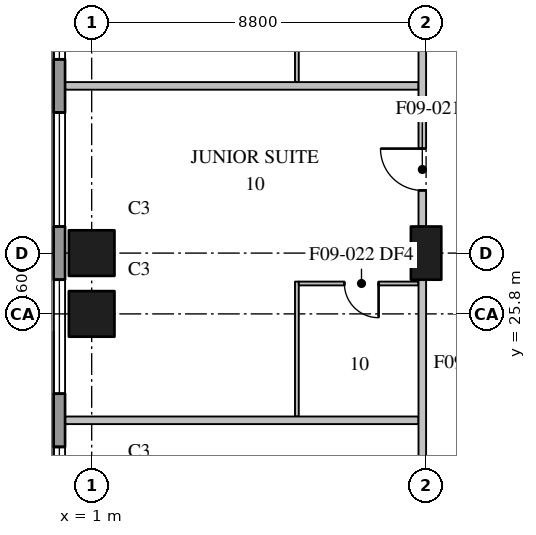
"""IFC4 building model, lengths in metres.
Left out: names, types, materials, properties, quantities, classifications, styles, units other than length and angle.
Written with IfcOpenShell. Run it as: python <this file> out.ifc"""

import sys

from ifc_helpers import new_model, si_unit, direction, frame, frame_2d, origin, origin_2d, place, context, subcontext, project, spatial, rectangle, extrude, element, fill, save


model = new_model("IFC4")
c1 = context("Model", 3, precision=1e-05, world=origin(), true_north=direction((0.0, 1.0)))
c2 = subcontext(c1, "Body", "Model", "MODEL_VIEW")
j1 = project(units=[si_unit("LENGTHUNIT", "METRE"), si_unit("PLANEANGLEUNIT", "RADIAN")], contexts=[c1])
p1 = place(None, origin())
s1 = spatial("IfcSite", under=j1, at=p1, CompositionType="ELEMENT")
p2 = place(p1, origin())
s2 = spatial("IfcBuilding", under=s1, at=p2, CompositionType="ELEMENT")
p3 = place(p2, frame((0.0, 0.0, 98.2)))
s3 = spatial("IfcBuildingStorey", under=s2, at=p3, CompositionType="ELEMENT", Elevation=98.2)
for number, where, z_axis, x_axis in (
    (1, (1.0, 25.8, 0.0), (0.0, 0.0, 1.0), (1.0, 0.0, 0.0)),
    (2, (1.0, 27.4, 0.0), (0.0, 0.0, 1.0), (1.0, 0.0, 0.0)),
):
    element("IfcColumn", number, at=place(p3, frame(where, z_axis=z_axis, x_axis=x_axis)), inside=s3, PredefinedType="COLUMN", context=c2, shape_type="SweptSolid", body=[
        extrude(rectangle(XDim=1.2, YDim=1.2, at=origin_2d()), origin(), (0.0, 0.0, 1.0), 3.7),
    ])
p4 = place(p3, frame((9.8, 27.4, 0.0), z_axis=(0.0, 0.0, 1.0), x_axis=(0.0, 1.0, 0.0)))
e3 = element("IfcColumn", 3, at=p4, inside=s3, PredefinedType="COLUMN", context=c2, shape_type="SweptSolid", body=[
    extrude(rectangle(XDim=1.4, YDim=0.8, at=origin_2d()), origin(), (0.0, 0.0, 1.0), 3.7),
])
p5 = place(p3, frame((0.15, 78.7, 0.0), z_axis=(0.0, 0.0, 1.0), x_axis=(0.0, -1.0, 0.0)))
e4 = element("IfcWall", 4, at=p5, inside=s3, PredefinedType="STANDARD", context=c2, shape_type="SweptSolid", body=[
    extrude(rectangle(XDim=76.5, YDim=0.3, at=frame_2d((38.25, 0.0))), origin(), (0.0, 0.0, 1.0), 3.3),
])
p6 = place(p5, frame((3.6, 0.0, 0.75)))
e5 = element("IfcOpeningElement", 5, at=p6, cuts=e4, PredefinedType="OPENING", context=c2, shape_type="SweptSolid", body=[
    extrude(rectangle(XDim=3.0, YDim=2.3, at=frame_2d((1.5, 1.15))), frame((0.0, 0.16, 0.0), z_axis=(0.0, -1.0, 0.0), x_axis=(1.0, 0.0, 0.0)), (0.0, 0.0, 1.0), 0.32),
])
p7 = place(p5, frame((8.0, 0.0, 0.75)))
e6 = element("IfcOpeningElement", 6, at=p7, cuts=e4, PredefinedType="OPENING", context=c2, shape_type="SweptSolid", body=[
    extrude(rectangle(XDim=3.0, YDim=2.3, at=frame_2d((1.5, 1.15))), frame((0.0, 0.16, 0.0), z_axis=(0.0, -1.0, 0.0), x_axis=(1.0, 0.0, 0.0)), (0.0, 0.0, 1.0), 0.32),
])
p8 = place(p5, frame((12.4, 0.0, 0.75)))
e7 = element("IfcOpeningElement", 7, at=p8, cuts=e4, PredefinedType="OPENING", context=c2, shape_type="SweptSolid", body=[
    extrude(rectangle(XDim=3.0, YDim=2.3, at=frame_2d((1.5, 1.15))), frame((0.0, 0.16, 0.0), z_axis=(0.0, -1.0, 0.0), x_axis=(1.0, 0.0, 0.0)), (0.0, 0.0, 1.0), 0.32),
])
p9 = place(p5, frame((16.8, 0.0, 0.75)))
e8 = element("IfcOpeningElement", 8, at=p9, cuts=e4, PredefinedType="OPENING", context=c2, shape_type="SweptSolid", body=[
    extrude(rectangle(XDim=3.0, YDim=2.3, at=frame_2d((1.5, 1.15))), frame((0.0, 0.16, 0.0), z_axis=(0.0, -1.0, 0.0), x_axis=(1.0, 0.0, 0.0)), (0.0, 0.0, 1.0), 0.32),
])
p10 = place(p5, frame((21.2, 0.0, 0.75)))
e9 = element("IfcOpeningElement", 9, at=p10, cuts=e4, PredefinedType="OPENING", context=c2, shape_type="SweptSolid", body=[
    extrude(rectangle(XDim=3.0, YDim=2.3, at=frame_2d((1.5, 1.15))), frame((0.0, 0.16, 0.0), z_axis=(0.0, -1.0, 0.0), x_axis=(1.0, 0.0, 0.0)), (0.0, 0.0, 1.0), 0.32),
])
p11 = place(p5, frame((25.6, 0.0, 0.75)))
e10 = element("IfcOpeningElement", 10, at=p11, cuts=e4, PredefinedType="OPENING", context=c2, shape_type="SweptSolid", body=[
    extrude(rectangle(XDim=3.0, YDim=2.3, at=frame_2d((1.5, 1.15))), frame((0.0, 0.16, 0.0), z_axis=(0.0, -1.0, 0.0), x_axis=(1.0, 0.0, 0.0)), (0.0, 0.0, 1.0), 0.32),
])
p12 = place(p5, frame((30.0, 0.0, 0.75)))
e11 = element("IfcOpeningElement", 11, at=p12, cuts=e4, PredefinedType="OPENING", context=c2, shape_type="SweptSolid", body=[
    extrude(rectangle(XDim=3.0, YDim=2.3, at=frame_2d((1.5, 1.15))), frame((0.0, 0.16, 0.0), z_axis=(0.0, -1.0, 0.0), x_axis=(1.0, 0.0, 0.0)), (0.0, 0.0, 1.0), 0.32),
])
p13 = place(p5, frame((34.4, 0.0, 0.75)))
e12 = element("IfcOpeningElement", 12, at=p13, cuts=e4, PredefinedType="OPENING", context=c2, shape_type="SweptSolid", body=[
    extrude(rectangle(XDim=3.0, YDim=2.3, at=frame_2d((1.5, 1.15))), frame((0.0, 0.16, 0.0), z_axis=(0.0, -1.0, 0.0), x_axis=(1.0, 0.0, 0.0)), (0.0, 0.0, 1.0), 0.32),
])
p14 = place(p5, frame((38.8, 0.0, 0.75)))
e13 = element("IfcOpeningElement", 13, at=p14, cuts=e4, PredefinedType="OPENING", context=c2, shape_type="SweptSolid", body=[
    extrude(rectangle(XDim=3.0, YDim=2.3, at=frame_2d((1.5, 1.15))), frame((0.0, 0.16, 0.0), z_axis=(0.0, -1.0, 0.0), x_axis=(1.0, 0.0, 0.0)), (0.0, 0.0, 1.0), 0.32),
])
p15 = place(p5, frame((43.2, 0.0, 0.75)))
e14 = element("IfcOpeningElement", 14, at=p15, cuts=e4, PredefinedType="OPENING", context=c2, shape_type="SweptSolid", body=[
    extrude(rectangle(XDim=3.0, YDim=2.3, at=frame_2d((1.5, 1.15))), frame((0.0, 0.16, 0.0), z_axis=(0.0, -1.0, 0.0), x_axis=(1.0, 0.0, 0.0)), (0.0, 0.0, 1.0), 0.32),
])
p16 = place(p5, frame((47.6, 0.0, 0.75)))
e15 = element("IfcOpeningElement", 15, at=p16, cuts=e4, PredefinedType="OPENING", context=c2, shape_type="SweptSolid", body=[
    extrude(rectangle(XDim=3.0, YDim=2.3, at=frame_2d((1.5, 1.15))), frame((0.0, 0.16, 0.0), z_axis=(0.0, -1.0, 0.0), x_axis=(1.0, 0.0, 0.0)), (0.0, 0.0, 1.0), 0.32),
])
p17 = place(p5, frame((52.0, 0.0, 0.75)))
e16 = element("IfcOpeningElement", 16, at=p17, cuts=e4, PredefinedType="OPENING", context=c2, shape_type="SweptSolid", body=[
    extrude(rectangle(XDim=3.0, YDim=2.3, at=frame_2d((1.5, 1.15))), frame((0.0, 0.16, 0.0), z_axis=(0.0, -1.0, 0.0), x_axis=(1.0, 0.0, 0.0)), (0.0, 0.0, 1.0), 0.32),
])
p18 = place(p5, frame((56.4, 0.0, 0.75)))
e17 = element("IfcOpeningElement", 17, at=p18, cuts=e4, PredefinedType="OPENING", context=c2, shape_type="SweptSolid", body=[
    extrude(rectangle(XDim=3.0, YDim=2.3, at=frame_2d((1.5, 1.15))), frame((0.0, 0.16, 0.0), z_axis=(0.0, -1.0, 0.0), x_axis=(1.0, 0.0, 0.0)), (0.0, 0.0, 1.0), 0.32),
])
p19 = place(p5, frame((60.8, 0.0, 0.75)))
e18 = element("IfcOpeningElement", 18, at=p19, cuts=e4, PredefinedType="OPENING", context=c2, shape_type="SweptSolid", body=[
    extrude(rectangle(XDim=3.0, YDim=2.3, at=frame_2d((1.5, 1.15))), frame((0.0, 0.16, 0.0), z_axis=(0.0, -1.0, 0.0), x_axis=(1.0, 0.0, 0.0)), (0.0, 0.0, 1.0), 0.32),
])
p20 = place(p5, frame((65.2, 0.0, 0.75)))
e19 = element("IfcOpeningElement", 19, at=p20, cuts=e4, PredefinedType="OPENING", context=c2, shape_type="SweptSolid", body=[
    extrude(rectangle(XDim=3.0, YDim=2.3, at=frame_2d((1.5, 1.15))), frame((0.0, 0.16, 0.0), z_axis=(0.0, -1.0, 0.0), x_axis=(1.0, 0.0, 0.0)), (0.0, 0.0, 1.0), 0.32),
])
p21 = place(p5, frame((69.6, 0.0, 0.75)))
e20 = element("IfcOpeningElement", 20, at=p21, cuts=e4, PredefinedType="OPENING", context=c2, shape_type="SweptSolid", body=[
    extrude(rectangle(XDim=3.0, YDim=2.3, at=frame_2d((1.5, 1.15))), frame((0.0, 0.16, 0.0), z_axis=(0.0, -1.0, 0.0), x_axis=(1.0, 0.0, 0.0)), (0.0, 0.0, 1.0), 0.32),
])
p22 = place(p3, frame((9.7, 21.6, 0.0), z_axis=(0.0, 0.0, 1.0), x_axis=(0.0, 1.0, 0.0)))
e21 = element("IfcWall", 21, at=p22, inside=s3, PredefinedType="PARTITIONING", context=c2, shape_type="SweptSolid", body=[
    extrude(rectangle(XDim=5.1, YDim=0.2, at=frame_2d((2.55, 0.0))), origin(), (0.0, 0.0, 1.0), 3.3),
])
p23 = place(p3, frame((9.7, 28.1, 0.0), z_axis=(0.0, 0.0, 1.0), x_axis=(0.0, 1.0, 0.0)))
e22 = element("IfcWall", 22, at=p23, inside=s3, PredefinedType="PARTITIONING", context=c2, shape_type="SweptSolid", body=[
    extrude(rectangle(XDim=7.4, YDim=0.2, at=frame_2d((3.7, 0.0))), origin(), (0.0, 0.0, 1.0), 3.3),
])
p24 = place(p23, frame((0.95, 0.0, 0.0)))
e23 = element("IfcOpeningElement", 23, at=p24, cuts=e22, PredefinedType="OPENING", context=c2, shape_type="SweptSolid", body=[
    extrude(rectangle(XDim=1.1, YDim=2.1, at=frame_2d((0.55, 1.05))), frame((0.0, 0.11, 0.0), z_axis=(0.0, -1.0, 0.0), x_axis=(1.0, 0.0, 0.0)), (0.0, 0.0, 1.0), 0.22),
])
for number, where, z_axis, x_axis in (
    (24, (0.31, 23.0, 0.0), (0.0, 0.0, 1.0), (1.0, 0.0, 0.0)),
    (25, (0.31, 31.8, 0.0), (0.0, 0.0, 1.0), (1.0, 0.0, 0.0)),
):
    element("IfcWall", number, at=place(p3, frame(where, z_axis=z_axis, x_axis=x_axis)), inside=s3, PredefinedType="PARTITIONING", context=c2, shape_type="SweptSolid", body=[
        extrude(rectangle(XDim=9.29, YDim=0.2, at=frame_2d((4.645, 0.0))), origin(), (0.0, 0.0, 1.0), 3.3),
    ])
p25 = place(p3, frame((6.4, 23.1, 0.0), z_axis=(0.0, 0.0, 1.0), x_axis=(0.0, 1.0, 0.0)))
e26 = element("IfcWall", 26, at=p25, inside=s3, PredefinedType="PARTITIONING", context=c2, shape_type="SweptSolid", body=[
    extrude(rectangle(XDim=3.55, YDim=0.1, at=frame_2d((1.775, 0.0))), origin(), (0.0, 0.0, 1.0), 3.3),
])
p26 = place(p3, frame((6.4, 31.9, 0.0), z_axis=(0.0, 0.0, 1.0), x_axis=(0.0, 1.0, 0.0)))
e27 = element("IfcWall", 27, at=p26, inside=s3, PredefinedType="PARTITIONING", context=c2, shape_type="SweptSolid", body=[
    extrude(rectangle(XDim=3.55, YDim=0.1, at=frame_2d((1.775, 0.0))), origin(), (0.0, 0.0, 1.0), 3.3),
])
p27 = place(p3, frame((9.6, 26.6, 0.0), z_axis=(0.0, 0.0, 1.0), x_axis=(-1.0, 0.0, 0.0)))
e28 = element("IfcWall", 28, at=p27, inside=s3, PredefinedType="PARTITIONING", context=c2, shape_type="SweptSolid", body=[
    extrude(rectangle(XDim=3.15, YDim=0.1, at=frame_2d((1.575, 0.0))), origin(), (0.0, 0.0, 1.0), 3.3),
])
p28 = place(p27, frame((1.05, 0.0, 0.0)))
e29 = element("IfcOpeningElement", 29, at=p28, cuts=e28, PredefinedType="OPENING", context=c2, shape_type="SweptSolid", body=[
    extrude(rectangle(XDim=0.9, YDim=2.1, at=frame_2d((0.45, 1.05))), frame((0.0, 0.06, 0.0), z_axis=(0.0, -1.0, 0.0), x_axis=(1.0, 0.0, 0.0)), (0.0, 0.0, 1.0), 0.12),
])
p29 = place(p15, origin())
e30 = element("IfcWindow", 30, at=p29, inside=s3, PartitioningType="SINGLE_PANEL", PredefinedType="WINDOW", context=c2, shape_type="SweptSolid", body=[
    extrude(rectangle(XDim=3.0, YDim=2.3, at=frame_2d((1.5, 1.15))), frame((0.0, 0.03, 0.0), z_axis=(0.0, -1.0, 0.0), x_axis=(1.0, 0.0, 0.0)), (0.0, 0.0, 1.0), 0.06),
])
fill(e14, e30)
p30 = place(p16, origin())
e31 = element("IfcWindow", 31, at=p30, inside=s3, PartitioningType="SINGLE_PANEL", PredefinedType="WINDOW", context=c2, shape_type="SweptSolid", body=[
    extrude(rectangle(XDim=3.0, YDim=2.3, at=frame_2d((1.5, 1.15))), frame((0.0, 0.03, 0.0), z_axis=(0.0, -1.0, 0.0), x_axis=(1.0, 0.0, 0.0)), (0.0, 0.0, 1.0), 0.06),
])
fill(e15, e31)
p31 = place(p17, origin())
e32 = element("IfcWindow", 32, at=p31, inside=s3, PartitioningType="SINGLE_PANEL", PredefinedType="WINDOW", context=c2, shape_type="SweptSolid", body=[
    extrude(rectangle(XDim=3.0, YDim=2.3, at=frame_2d((1.5, 1.15))), frame((0.0, 0.03, 0.0), z_axis=(0.0, -1.0, 0.0), x_axis=(1.0, 0.0, 0.0)), (0.0, 0.0, 1.0), 0.06),
])
fill(e16, e32)
p32 = place(p18, origin())
e33 = element("IfcWindow", 33, at=p32, inside=s3, PartitioningType="SINGLE_PANEL", PredefinedType="WINDOW", context=c2, shape_type="SweptSolid", body=[
    extrude(rectangle(XDim=3.0, YDim=2.3, at=frame_2d((1.5, 1.15))), frame((0.0, 0.03, 0.0), z_axis=(0.0, -1.0, 0.0), x_axis=(1.0, 0.0, 0.0)), (0.0, 0.0, 1.0), 0.06),
])
fill(e17, e33)
p33 = place(p24, origin())
e34 = element("IfcDoor", 34, at=p33, inside=s3, OperationType="SINGLE_SWING_RIGHT", PredefinedType="DOOR", context=c2, shape_type="SweptSolid", body=[
    extrude(rectangle(XDim=1.1, YDim=2.1, at=frame_2d((0.55, 1.05))), frame((0.0, 0.025, 0.0), z_axis=(0.0, -1.0, 0.0), x_axis=(1.0, 0.0, 0.0)), (0.0, 0.0, 1.0), 0.05),
])
fill(e23, e34)
p34 = place(p28, origin())
e35 = element("IfcDoor", 35, at=p34, inside=s3, OperationType="SINGLE_SWING_LEFT", PredefinedType="DOOR", context=c2, shape_type="SweptSolid", body=[
    extrude(rectangle(XDim=0.9, YDim=2.1, at=frame_2d((0.45, 1.05))), frame((0.0, 0.025, 0.0), z_axis=(0.0, -1.0, 0.0), x_axis=(1.0, 0.0, 0.0)), (0.0, 0.0, 1.0), 0.05),
])
fill(e29, e35)
save(model, sys.argv[1])
